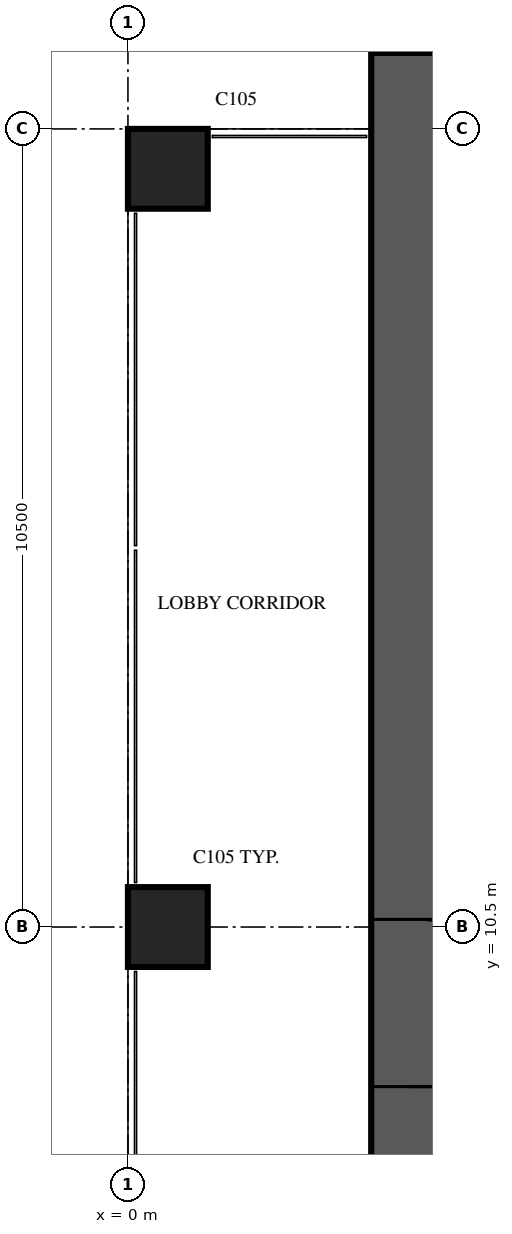
"""IFC4 building model, lengths in metres.
Left out: names, types, materials, properties, quantities, classifications, styles, units other than length and angle.
Written with IfcOpenShell. Run it as: python <this file> out.ifc"""

import sys

from ifc_helpers import new_model, si_unit, direction, frame, frame_2d, origin, origin_2d, place, context, subcontext, project, spatial, rectangle, extrude, source, transform, mapped, element, fill, save


model = new_model("IFC4")
c1 = context("Model", 3, precision=1e-05, world=origin(), true_north=direction((0.0, 1.0)))
c2 = subcontext(c1, "Body", "Model", "MODEL_VIEW")
j1 = project(units=[si_unit("LENGTHUNIT", "METRE"), si_unit("PLANEANGLEUNIT", "RADIAN")], contexts=[c1])
p1 = place(None, origin())
s1 = spatial("IfcSite", under=j1, at=p1, CompositionType="ELEMENT")
p2 = place(p1, origin())
s2 = spatial("IfcBuilding", under=s1, at=p2, CompositionType="ELEMENT")
p3 = place(p2, frame((0.0, 0.0, 170.3)))
s3 = spatial("IfcBuildingStorey", under=s2, at=p3, CompositionType="ELEMENT", Elevation=170.3)
m1 = source(origin(), c2, "Body", "SweptSolid", [
    extrude(rectangle(XDim=1.05, YDim=1.05, at=origin_2d()), origin(), (0.0, 0.0, 1.0), 7.5),
])
for number, where, z_axis, x_axis in (
    (1, (0.525, 10.5, 0.0), (0.0, 0.0, 1.0), (1.0, 0.0, 0.0)),
    (2, (0.525, 20.475, 0.0), (0.0, 0.0, 1.0), (1.0, 0.0, 0.0)),
):
    element("IfcColumn", number, at=place(p3, frame(where, z_axis=z_axis, x_axis=x_axis)), inside=s3, PredefinedType="COLUMN", context=c2, shape_type="MappedRepresentation", body=[
        mapped(m1, transform((0.0, 0.0, 0.0), scale=1.0)),
    ])
p4 = place(p3, frame((3.7, 4.2, 0.0), z_axis=(0.0, 0.0, 1.0), x_axis=(0.0, 1.0, 0.0)))
e3 = element("IfcWall", 3, at=p4, inside=s3, PredefinedType="SHEAR", context=c2, shape_type="SweptSolid", body=[
    extrude(rectangle(XDim=17.8, YDim=1.0, at=frame_2d((8.9, 0.0))), origin(), (0.0, 0.0, 1.0), 7.5),
])
m2 = source(origin(), c2, "Body", "SweptSolid", [
    extrude(rectangle(XDim=2.2, YDim=2.1, at=frame_2d((1.1, 1.05))), frame((0.0, 0.51, 0.0), z_axis=(0.0, -1.0, 0.0), x_axis=(1.0, 0.0, 0.0)), (0.0, 0.0, 1.0), 1.02),
])
p5 = place(p4, frame((4.2, 0.0, 0.0)))
e4 = element("IfcOpeningElement", 4, at=p5, cuts=e3, PredefinedType="OPENING", context=c2, shape_type="MappedRepresentation", body=[
    mapped(m2, transform((0.0, 0.0, 0.0), scale=1.0)),
])
m3 = source(origin(), c2, "Body", "SweptSolid", [
    extrude(rectangle(XDim=2.2, YDim=2.1, at=frame_2d((1.1, 1.05))), frame((0.0, 0.025, 0.0), z_axis=(0.0, -1.0, 0.0), x_axis=(1.0, 0.0, 0.0)), (0.0, 0.0, 1.0), 0.05),
])
p6 = place(p5, origin())
e5 = element("IfcDoor", 5, at=p6, inside=s3, OperationType="DOUBLE_DOOR_SINGLE_SWING", PredefinedType="DOOR", context=c2, shape_type="MappedRepresentation", body=[
    mapped(m3, transform((0.0, 0.0, 0.0), scale=1.0)),
])
fill(e4, e5)
save(model, sys.argv[1])
